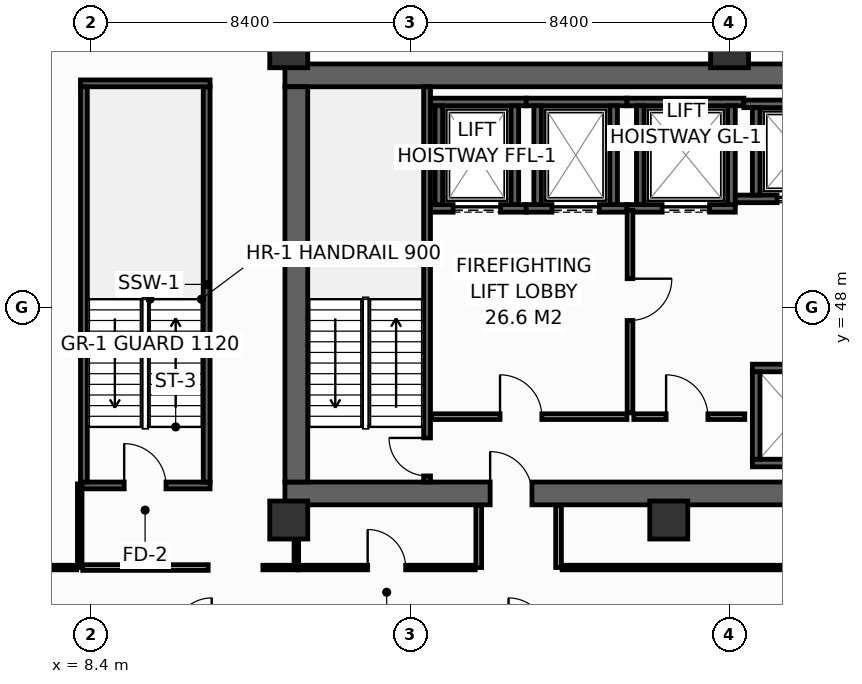
"""IFC4 building model, lengths in metres.
Left out: names, types, materials, properties, quantities, classifications, styles, units other than length and angle.
Written with IfcOpenShell. Run it as: python <this file> out.ifc"""

import sys

from ifc_helpers import new_model, si_unit, direction, frame, frame_2d, origin, origin_2d, place, context, subcontext, project, spatial, rectangle, hollow_rectangle, extrude, element, fill, save


model = new_model("IFC4")
c1 = context("Model", 3, precision=1e-05, world=origin(), true_north=direction((0.0, 1.0)))
c2 = subcontext(c1, "Body", "Model", "MODEL_VIEW")
j1 = project(units=[si_unit("LENGTHUNIT", "METRE"), si_unit("PLANEANGLEUNIT", "RADIAN")], contexts=[c1])
p1 = place(None, origin())
s1 = spatial("IfcSite", under=j1, at=p1, CompositionType="ELEMENT")
p2 = place(p1, origin())
s2 = spatial("IfcBuilding", under=s1, at=p2, CompositionType="ELEMENT")
p3 = place(p2, frame((0.0, 0.0, 106.0)))
s3 = spatial("IfcBuildingStorey", under=s2, at=p3, CompositionType="ELEMENT", Elevation=106.0)
p4 = place(p3, frame((13.5, 43.1, 0.0), z_axis=(0.0, 0.0, 1.0), x_axis=(1.0, 0.0, 0.0)))
e1 = element("IfcWall", 1, at=p4, inside=s3, PredefinedType="SHEAR", context=c2, shape_type="SweptSolid", body=[
    extrude(rectangle(XDim=32.9, YDim=0.6, at=frame_2d((16.45, 0.0))), origin(), (0.0, 0.0, 1.0), 4.15),
])
p5 = place(p4, frame((5.4, 0.0, 0.0)))
e2 = element("IfcOpeningElement", 2, at=p5, cuts=e1, PredefinedType="OPENING", context=c2, shape_type="SweptSolid", body=[
    extrude(rectangle(XDim=1.1, YDim=2.15, at=frame_2d((0.55, 1.075))), frame((0.0, 0.31, 0.0), z_axis=(0.0, -1.0, 0.0), x_axis=(1.0, 0.0, 0.0)), (0.0, 0.0, 1.0), 0.62),
])
p6 = place(p4, frame((25.6, 0.0, 0.0)))
e3 = element("IfcOpeningElement", 3, at=p6, cuts=e1, PredefinedType="OPENING", context=c2, shape_type="SweptSolid", body=[
    extrude(rectangle(XDim=1.1, YDim=2.15, at=frame_2d((0.55, 1.075))), frame((0.0, 0.31, 0.0), z_axis=(0.0, -1.0, 0.0), x_axis=(1.0, 0.0, 0.0)), (0.0, 0.0, 1.0), 0.62),
])
p7 = place(p3, frame((13.5, 54.1, 0.0), z_axis=(0.0, 0.0, 1.0), x_axis=(1.0, 0.0, 0.0)))
e4 = element("IfcWall", 4, at=p7, inside=s3, PredefinedType="SHEAR", context=c2, shape_type="SweptSolid", body=[
    extrude(rectangle(XDim=32.9, YDim=0.6, at=frame_2d((16.45, 0.0))), origin(), (0.0, 0.0, 1.0), 4.15),
])
p8 = place(p3, frame((13.8, 43.4, 0.0), z_axis=(0.0, 0.0, 1.0), x_axis=(0.0, 1.0, 0.0)))
e5 = element("IfcWall", 5, at=p8, inside=s3, PredefinedType="SHEAR", context=c2, shape_type="SweptSolid", body=[
    extrude(rectangle(XDim=10.4, YDim=0.6, at=frame_2d((5.2, 0.0))), origin(), (0.0, 0.0, 1.0), 4.15),
])
for number, where, z_axis, x_axis in (
    (6, (13.6, 54.8, 0.0), (0.0, 0.0, 1.0), (1.0, 0.0, 0.0)),
    (7, (25.2, 54.8, 0.0), (0.0, 0.0, 1.0), (1.0, 0.0, 0.0)),
    (8, (13.6, 42.4, 0.0), (0.0, 0.0, 1.0), (1.0, 0.0, 0.0)),
    (9, (23.6, 42.4, 0.0), (0.0, 0.0, 1.0), (1.0, 0.0, 0.0)),
):
    element("IfcColumn", number, at=place(p3, frame(where, z_axis=z_axis, x_axis=x_axis)), inside=s3, PredefinedType="COLUMN", context=c2, shape_type="SweptSolid", body=[
        extrude(hollow_rectangle(XDim=1.0, YDim=1.0, WallThickness=0.045, at=origin_2d()), origin(), (0.0, 0.0, 1.0), 4.4),
    ])
p9 = place(p3, frame((17.33, 50.6, 0.0), z_axis=(0.0, 0.0, 1.0), x_axis=(1.0, 0.0, 0.0)))
e10 = element("IfcWall", 10, at=p9, inside=s3, PredefinedType="SHEAR", context=c2, shape_type="SweptSolid", body=[
    extrude(rectangle(XDim=2.52, YDim=0.2, at=frame_2d((1.26, 0.0))), origin(), (0.0, 0.0, 1.0), 4.15),
])
p10 = place(p9, frame((0.595, 0.0, 0.0)))
e11 = element("IfcOpeningElement", 11, at=p10, cuts=e10, PredefinedType="OPENING", context=c2, shape_type="SweptSolid", body=[
    extrude(rectangle(XDim=1.25, YDim=2.3, at=frame_2d((0.625, 1.15))), frame((0.0, 0.11, 0.0), z_axis=(0.0, -1.0, 0.0), x_axis=(1.0, 0.0, 0.0)), (0.0, 0.0, 1.0), 0.22),
])
p11 = place(p3, frame((17.33, 53.4, 0.0), z_axis=(0.0, 0.0, 1.0), x_axis=(1.0, 0.0, 0.0)))
e12 = element("IfcWall", 12, at=p11, inside=s3, PredefinedType="SHEAR", context=c2, shape_type="SweptSolid", body=[
    extrude(rectangle(XDim=2.52, YDim=0.2, at=frame_2d((1.26, 0.0))), origin(), (0.0, 0.0, 1.0), 4.15),
])
for number, where, z_axis, x_axis in (
    (13, (17.55, 50.7, 0.0), (0.0, 0.0, 1.0), (0.0, 1.0, 0.0)),
    (14, (19.55, 50.7, 0.0), (0.0, 0.0, 1.0), (0.0, 1.0, 0.0)),
):
    element("IfcWall", number, at=place(p3, frame(where, z_axis=z_axis, x_axis=x_axis)), inside=s3, PredefinedType="SHEAR", context=c2, shape_type="SweptSolid", body=[
        extrude(rectangle(XDim=2.6, YDim=0.2, at=frame_2d((1.3, 0.0))), origin(), (0.0, 0.0, 1.0), 4.15),
    ])
p12 = place(p3, frame((19.85, 50.6, 0.0), z_axis=(0.0, 0.0, 1.0), x_axis=(1.0, 0.0, 0.0)))
e15 = element("IfcWall", 15, at=p12, inside=s3, PredefinedType="SHEAR", context=c2, shape_type="SweptSolid", body=[
    extrude(rectangle(XDim=2.65, YDim=0.2, at=frame_2d((1.325, 0.0))), origin(), (0.0, 0.0, 1.0), 4.15),
])
p13 = place(p12, frame((0.675, 0.0, 0.0)))
e16 = element("IfcOpeningElement", 16, at=p13, cuts=e15, PredefinedType="OPENING", context=c2, shape_type="SweptSolid", body=[
    extrude(rectangle(XDim=1.25, YDim=2.3, at=frame_2d((0.625, 1.15))), frame((0.0, 0.11, 0.0), z_axis=(0.0, -1.0, 0.0), x_axis=(1.0, 0.0, 0.0)), (0.0, 0.0, 1.0), 0.22),
])
p14 = place(p3, frame((19.85, 53.4, 0.0), z_axis=(0.0, 0.0, 1.0), x_axis=(1.0, 0.0, 0.0)))
e17 = element("IfcWall", 17, at=p14, inside=s3, PredefinedType="SHEAR", context=c2, shape_type="SweptSolid", body=[
    extrude(rectangle(XDim=2.65, YDim=0.2, at=frame_2d((1.325, 0.0))), origin(), (0.0, 0.0, 1.0), 4.15),
])
for number, where, z_axis, x_axis in (
    (18, (20.15, 50.7, 0.0), (0.0, 0.0, 1.0), (0.0, 1.0, 0.0)),
    (19, (22.15, 50.7, 0.0), (0.0, 0.0, 1.0), (0.0, 1.0, 0.0)),
):
    element("IfcWall", number, at=place(p3, frame(where, z_axis=z_axis, x_axis=x_axis)), inside=s3, PredefinedType="SHEAR", context=c2, shape_type="SweptSolid", body=[
        extrude(rectangle(XDim=2.6, YDim=0.2, at=frame_2d((1.3, 0.0))), origin(), (0.0, 0.0, 1.0), 4.15),
    ])
p15 = place(p3, frame((22.5, 50.6, 0.0), z_axis=(0.0, 0.0, 1.0), x_axis=(1.0, 0.0, 0.0)))
e20 = element("IfcWall", 20, at=p15, inside=s3, PredefinedType="SHEAR", context=c2, shape_type="SweptSolid", body=[
    extrude(rectangle(XDim=2.85, YDim=0.2, at=frame_2d((1.425, 0.0))), origin(), (0.0, 0.0, 1.0), 4.15),
])
p16 = place(p15, frame((0.925, 0.0, 0.0)))
e21 = element("IfcOpeningElement", 21, at=p16, cuts=e20, PredefinedType="OPENING", context=c2, shape_type="SweptSolid", body=[
    extrude(rectangle(XDim=1.25, YDim=2.3, at=frame_2d((0.625, 1.15))), frame((0.0, 0.11, 0.0), z_axis=(0.0, -1.0, 0.0), x_axis=(1.0, 0.0, 0.0)), (0.0, 0.0, 1.0), 0.22),
])
p17 = place(p3, frame((22.5, 53.4, 0.0), z_axis=(0.0, 0.0, 1.0), x_axis=(1.0, 0.0, 0.0)))
e22 = element("IfcWall", 22, at=p17, inside=s3, PredefinedType="SHEAR", context=c2, shape_type="SweptSolid", body=[
    extrude(rectangle(XDim=3.075, YDim=0.2, at=frame_2d((1.538, 0.0))), origin(), (0.0, 0.0, 1.0), 4.15),
])
for number, where, z_axis, x_axis in (
    (23, (22.85, 50.7, 0.0), (0.0, 0.0, 1.0), (0.0, 1.0, 0.0)),
    (24, (25.25, 50.7, 0.0), (0.0, 0.0, 1.0), (0.0, 1.0, 0.0)),
):
    element("IfcWall", number, at=place(p3, frame(where, z_axis=z_axis, x_axis=x_axis)), inside=s3, PredefinedType="SHEAR", context=c2, shape_type="SweptSolid", body=[
        extrude(rectangle(XDim=2.6, YDim=0.2, at=frame_2d((1.3, 0.0))), origin(), (0.0, 0.0, 1.0), 4.15),
    ])
p18 = place(p3, frame((25.35, 50.85, 0.0), z_axis=(0.0, 0.0, 1.0), x_axis=(1.0, 0.0, 0.0)))
e25 = element("IfcWall", 25, at=p18, inside=s3, PredefinedType="SHEAR", context=c2, shape_type="SweptSolid", body=[
    extrude(rectangle(XDim=3.025, YDim=0.2, at=frame_2d((1.512, 0.0))), origin(), (0.0, 0.0, 1.0), 4.15),
])
p19 = place(p18, frame((1.1, 0.0, 0.0)))
e26 = element("IfcOpeningElement", 26, at=p19, cuts=e25, PredefinedType="OPENING", context=c2, shape_type="SweptSolid", body=[
    extrude(rectangle(XDim=1.1, YDim=2.2, at=frame_2d((0.55, 1.1))), frame((0.0, 0.11, 0.0), z_axis=(0.0, -1.0, 0.0), x_axis=(1.0, 0.0, 0.0)), (0.0, 0.0, 1.0), 0.22),
])
p20 = place(p3, frame((25.575, 53.35, 0.0), z_axis=(0.0, 0.0, 1.0), x_axis=(1.0, 0.0, 0.0)))
e27 = element("IfcWall", 27, at=p20, inside=s3, PredefinedType="SHEAR", context=c2, shape_type="SweptSolid", body=[
    extrude(rectangle(XDim=2.8, YDim=0.2, at=frame_2d((1.4, 0.0))), origin(), (0.0, 0.0, 1.0), 4.15),
])
p21 = place(p3, frame((25.9, 50.95, 0.0), z_axis=(0.0, 0.0, 1.0), x_axis=(0.0, 1.0, 0.0)))
e28 = element("IfcWall", 28, at=p21, inside=s3, PredefinedType="SHEAR", context=c2, shape_type="SweptSolid", body=[
    extrude(rectangle(XDim=2.3, YDim=0.2, at=frame_2d((1.15, 0.0))), origin(), (0.0, 0.0, 1.0), 4.15),
])
for number, where, z_axis, x_axis in (
    (29, (25.8, 43.9, 0.0), (0.0, 0.0, 1.0), (1.0, 0.0, 0.0)),
    (30, (25.8, 46.4, 0.0), (0.0, 0.0, 1.0), (1.0, 0.0, 0.0)),
):
    element("IfcWall", number, at=place(p3, frame(where, z_axis=z_axis, x_axis=x_axis)), inside=s3, PredefinedType="SHEAR", context=c2, shape_type="SweptSolid", body=[
        extrude(rectangle(XDim=2.575, YDim=0.2, at=frame_2d((1.288, 0.0))), origin(), (0.0, 0.0, 1.0), 4.15),
    ])
p22 = place(p3, frame((25.9, 44.0, 0.0), z_axis=(0.0, 0.0, 1.0), x_axis=(0.0, 1.0, 0.0)))
e31 = element("IfcWall", 31, at=p22, inside=s3, PredefinedType="SHEAR", context=c2, shape_type="SweptSolid", body=[
    extrude(rectangle(XDim=2.3, YDim=0.2, at=frame_2d((1.15, 0.0))), origin(), (0.0, 0.0, 1.0), 4.15),
])
p23 = place(p3, frame((17.24, 43.4, 0.0), z_axis=(0.0, 0.0, 1.0), x_axis=(0.0, 1.0, 0.0)))
e32 = element("IfcWall", 32, at=p23, inside=s3, PredefinedType="SHEAR", context=c2, shape_type="SweptSolid", body=[
    extrude(rectangle(XDim=10.4, YDim=0.18, at=frame_2d((5.2, 0.0))), origin(), (0.0, 0.0, 1.0), 4.15),
])
p24 = place(p23, frame((0.16, 0.0, 0.0)))
e33 = element("IfcOpeningElement", 33, at=p24, cuts=e32, PredefinedType="OPENING", context=c2, shape_type="SweptSolid", body=[
    extrude(rectangle(XDim=1.0, YDim=2.15, at=frame_2d((0.5, 1.075))), frame((0.0, 0.1, 0.0), z_axis=(0.0, -1.0, 0.0), x_axis=(1.0, 0.0, 0.0)), (0.0, 0.0, 1.0), 0.2),
])
p25 = place(p3, frame((8.12, 43.31, 0.0), z_axis=(0.0, 0.0, 1.0), x_axis=(1.0, 0.0, 0.0)))
e34 = element("IfcWall", 34, at=p25, inside=s3, PredefinedType="SHEAR", context=c2, shape_type="SweptSolid", body=[
    extrude(rectangle(XDim=3.41, YDim=0.18, at=frame_2d((1.705, 0.0))), origin(), (0.0, 0.0, 1.0), 4.15),
])
p26 = place(p25, frame((1.15, 0.0, 0.0)))
e35 = element("IfcOpeningElement", 35, at=p26, cuts=e34, PredefinedType="OPENING", context=c2, shape_type="SweptSolid", body=[
    extrude(rectangle(XDim=1.1, YDim=2.15, at=frame_2d((0.55, 1.075))), frame((0.0, 0.1, 0.0), z_axis=(0.0, -1.0, 0.0), x_axis=(1.0, 0.0, 0.0)), (0.0, 0.0, 1.0), 0.2),
])
p27 = place(p3, frame((11.44, 43.4, 0.0), z_axis=(0.0, 0.0, 1.0), x_axis=(0.0, 1.0, 0.0)))
e36 = element("IfcWall", 36, at=p27, inside=s3, PredefinedType="SHEAR", context=c2, shape_type="SweptSolid", body=[
    extrude(rectangle(XDim=10.4, YDim=0.18, at=frame_2d((5.2, 0.0))), origin(), (0.0, 0.0, 1.0), 4.15),
])
p28 = place(p3, frame((11.53, 53.89, 0.0), z_axis=(0.0, 0.0, 1.0), x_axis=(-1.0, 0.0, 0.0)))
e37 = element("IfcWall", 37, at=p28, inside=s3, PredefinedType="SHEAR", context=c2, shape_type="SweptSolid", body=[
    extrude(rectangle(XDim=3.41, YDim=0.18, at=frame_2d((1.705, 0.0))), origin(), (0.0, 0.0, 1.0), 4.15),
])
p29 = place(p3, frame((8.21, 53.8, 0.0), z_axis=(0.0, 0.0, 1.0), x_axis=(0.0, -1.0, 0.0)))
e38 = element("IfcWall", 38, at=p29, inside=s3, PredefinedType="SHEAR", context=c2, shape_type="SweptSolid", body=[
    extrude(rectangle(XDim=10.4, YDim=0.18, at=frame_2d((5.2, 0.0))), origin(), (0.0, 0.0, 1.0), 4.15),
])
p30 = place(p3, frame((17.36, 45.12, 0.0), z_axis=(0.0, 0.0, 1.0), x_axis=(1.0, 0.0, 0.0)))
e39 = element("IfcWall", 39, at=p30, inside=s3, PredefinedType="PARTITIONING", context=c2, shape_type="SweptSolid", body=[
    extrude(rectangle(XDim=5.14, YDim=0.15, at=frame_2d((2.57, 0.0))), origin(), (0.0, 0.0, 1.0), 4.15),
])
p31 = place(p30, frame((1.8, 0.0, 0.0)))
e40 = element("IfcOpeningElement", 40, at=p31, cuts=e39, PredefinedType="OPENING", context=c2, shape_type="SweptSolid", body=[
    extrude(rectangle(XDim=1.1, YDim=2.15, at=frame_2d((0.55, 1.075))), frame((0.0, 0.085, 0.0), z_axis=(0.0, -1.0, 0.0), x_axis=(1.0, 0.0, 0.0)), (0.0, 0.0, 1.0), 0.17),
])
p32 = place(p3, frame((22.58, 50.55, 0.0), z_axis=(0.0, 0.0, 1.0), x_axis=(0.0, -1.0, 0.0)))
e41 = element("IfcWall", 41, at=p32, inside=s3, PredefinedType="PARTITIONING", context=c2, shape_type="SweptSolid", body=[
    extrude(rectangle(XDim=5.33, YDim=0.15, at=frame_2d((2.665, 0.0))), origin(), (0.0, 0.0, 1.0), 4.15),
])
p33 = place(p32, frame((1.8, 0.0, 0.0)))
e42 = element("IfcOpeningElement", 42, at=p33, cuts=e41, PredefinedType="OPENING", context=c2, shape_type="SweptSolid", body=[
    extrude(rectangle(XDim=1.1, YDim=2.15, at=frame_2d((0.55, 1.075))), frame((0.0, 0.085, 0.0), z_axis=(0.0, -1.0, 0.0), x_axis=(1.0, 0.0, 0.0)), (0.0, 0.0, 1.0), 0.17),
])
p34 = place(p3, frame((22.68, 45.12, 0.0), z_axis=(0.0, 0.0, 1.0), x_axis=(1.0, 0.0, 0.0)))
e43 = element("IfcWall", 43, at=p34, inside=s3, PredefinedType="PARTITIONING", context=c2, shape_type="SweptSolid", body=[
    extrude(rectangle(XDim=2.92, YDim=0.15, at=frame_2d((1.46, 0.0))), origin(), (0.0, 0.0, 1.0), 4.15),
])
p35 = place(p34, frame((0.85, 0.0, 0.0)))
e44 = element("IfcOpeningElement", 44, at=p35, cuts=e43, PredefinedType="OPENING", context=c2, shape_type="SweptSolid", body=[
    extrude(rectangle(XDim=1.1, YDim=2.15, at=frame_2d((0.55, 1.075))), frame((0.0, 0.085, 0.0), z_axis=(0.0, -1.0, 0.0), x_axis=(1.0, 0.0, 0.0)), (0.0, 0.0, 1.0), 0.17),
])
p36 = place(p3, frame((12.92, 41.15, 0.0), z_axis=(0.0, 0.0, 1.0), x_axis=(1.0, 0.0, 0.0)))
e45 = element("IfcWall", 45, at=p36, inside=s3, PredefinedType="PARTITIONING", context=c2, shape_type="SweptSolid", body=[
    extrude(rectangle(XDim=0.93, YDim=0.12, at=frame_2d((0.465, 0.0))), origin(), (0.0, 0.0, 1.0), 4.15),
])
p37 = place(p3, frame((13.8, 41.23, 0.0), z_axis=(0.0, 0.0, 1.0), x_axis=(0.0, 1.0, 0.0)))
e46 = element("IfcWall", 46, at=p37, inside=s3, PredefinedType="PARTITIONING", context=c2, shape_type="SweptSolid", body=[
    extrude(rectangle(XDim=1.55, YDim=0.12, at=frame_2d((0.775, 0.0))), origin(), (0.0, 0.0, 1.0), 4.15),
])
p38 = place(p3, frame((8.1, 41.15, 0.0), z_axis=(0.0, 0.0, 1.0), x_axis=(0.0, 1.0, 0.0)))
e47 = element("IfcWall", 47, at=p38, inside=s3, PredefinedType="PARTITIONING", context=c2, shape_type="SweptSolid", body=[
    extrude(rectangle(XDim=2.2, YDim=0.12, at=frame_2d((1.1, 0.0))), origin(), (0.0, 0.0, 1.0), 3.335),
])
p39 = place(p3, frame((8.18, 41.15, 0.0), z_axis=(0.0, 0.0, 1.0), x_axis=(1.0, 0.0, 0.0)))
e48 = element("IfcWall", 48, at=p39, inside=s3, PredefinedType="PARTITIONING", context=c2, shape_type="SweptSolid", body=[
    extrude(rectangle(XDim=3.3, YDim=0.15, at=frame_2d((1.65, 0.0))), origin(), (0.0, 0.0, 1.0), 4.15),
])
p40 = place(p3, frame((5.942, 41.15, 0.0), z_axis=(0.0, 0.0, 1.0), x_axis=(1.0, 0.0, 0.0)))
e49 = element("IfcWall", 49, at=p40, inside=s3, PredefinedType="PARTITIONING", context=c2, shape_type="SweptSolid", body=[
    extrude(rectangle(XDim=2.078, YDim=0.12, at=frame_2d((1.039, 0.0))), origin(), (0.0, 0.0, 1.0), 3.635),
])
for number, where, z_axis, x_axis in (
    (50, (18.6, 41.15, 0.0), (0.0, 0.0, 1.0), (0.0, 1.0, 0.0)),
    (51, (20.7, 41.15, 0.0), (0.0, 0.0, 1.0), (0.0, 1.0, 0.0)),
):
    element("IfcWall", number, at=place(p3, frame(where, z_axis=z_axis, x_axis=x_axis)), inside=s3, PredefinedType="PARTITIONING", context=c2, shape_type="SweptSolid", body=[
        extrude(rectangle(XDim=1.63, YDim=0.15, at=frame_2d((0.815, 0.0))), origin(), (0.0, 0.0, 1.0), 4.15),
    ])
p41 = place(p3, frame((13.85, 41.15, 0.0), z_axis=(0.0, 0.0, 1.0), x_axis=(1.0, 0.0, 0.0)))
e52 = element("IfcWall", 52, at=p41, inside=s3, PredefinedType="PARTITIONING", context=c2, shape_type="SweptSolid", body=[
    extrude(rectangle(XDim=4.655, YDim=0.12, at=frame_2d((2.327, 0.0))), origin(), (0.0, 0.0, 1.0), 4.15),
])
p42 = place(p41, frame((1.827, 0.0, 0.0)))
e53 = element("IfcOpeningElement", 53, at=p42, cuts=e52, PredefinedType="OPENING", context=c2, shape_type="SweptSolid", body=[
    extrude(rectangle(XDim=1.0, YDim=2.15, at=frame_2d((0.5, 1.075))), frame((0.0, 0.07, 0.0), z_axis=(0.0, -1.0, 0.0), x_axis=(1.0, 0.0, 0.0)), (0.0, 0.0, 1.0), 0.14),
])
p43 = place(p3, frame((20.795, 41.15, 0.0), z_axis=(0.0, 0.0, 1.0), x_axis=(1.0, 0.0, 0.0)))
e54 = element("IfcWall", 54, at=p43, inside=s3, PredefinedType="PARTITIONING", context=c2, shape_type="SweptSolid", body=[
    extrude(rectangle(XDim=17.91, YDim=0.12, at=frame_2d((8.955, 0.0))), origin(), (0.0, 0.0, 1.0), 3.335),
])
p44 = place(p43, frame((8.455, 0.0, 0.0)))
e55 = element("IfcOpeningElement", 55, at=p44, cuts=e54, PredefinedType="OPENING", context=c2, shape_type="SweptSolid", body=[
    extrude(rectangle(XDim=1.0, YDim=2.15, at=frame_2d((0.5, 1.075))), frame((0.0, 0.07, 0.0), z_axis=(0.0, -1.0, 0.0), x_axis=(1.0, 0.0, 0.0)), (0.0, 0.0, 1.0), 0.14),
])
p45 = place(p10, origin())
e56 = element("IfcDoor", 56, at=p45, inside=s3, OperationType="SLIDING_TO_LEFT", PredefinedType="DOOR", context=c2, shape_type="SweptSolid", body=[
    extrude(rectangle(XDim=1.25, YDim=2.3, at=frame_2d((0.625, 1.15))), frame((0.0, 0.025, 0.0), z_axis=(0.0, -1.0, 0.0), x_axis=(1.0, 0.0, 0.0)), (0.0, 0.0, 1.0), 0.05),
])
fill(e11, e56)
p46 = place(p13, origin())
e57 = element("IfcDoor", 57, at=p46, inside=s3, OperationType="SLIDING_TO_LEFT", PredefinedType="DOOR", context=c2, shape_type="SweptSolid", body=[
    extrude(rectangle(XDim=1.25, YDim=2.3, at=frame_2d((0.625, 1.15))), frame((0.0, 0.025, 0.0), z_axis=(0.0, -1.0, 0.0), x_axis=(1.0, 0.0, 0.0)), (0.0, 0.0, 1.0), 0.05),
])
fill(e16, e57)
p47 = place(p16, origin())
e58 = element("IfcDoor", 58, at=p47, inside=s3, OperationType="SLIDING_TO_LEFT", PredefinedType="DOOR", context=c2, shape_type="SweptSolid", body=[
    extrude(rectangle(XDim=1.25, YDim=2.3, at=frame_2d((0.625, 1.15))), frame((0.0, 0.025, 0.0), z_axis=(0.0, -1.0, 0.0), x_axis=(1.0, 0.0, 0.0)), (0.0, 0.0, 1.0), 0.05),
])
fill(e21, e58)
p48 = place(p19, origin())
e59 = element("IfcDoor", 59, at=p48, inside=s3, OperationType="SLIDING_TO_LEFT", PredefinedType="DOOR", context=c2, shape_type="SweptSolid", body=[
    extrude(rectangle(XDim=1.1, YDim=2.2, at=frame_2d((0.55, 1.1))), frame((0.0, 0.025, 0.0), z_axis=(0.0, -1.0, 0.0), x_axis=(1.0, 0.0, 0.0)), (0.0, 0.0, 1.0), 0.05),
])
fill(e26, e59)
p49 = place(p24, origin())
e60 = element("IfcDoor", 60, at=p49, inside=s3, OperationType="SINGLE_SWING_RIGHT", PredefinedType="DOOR", context=c2, shape_type="SweptSolid", body=[
    extrude(rectangle(XDim=1.0, YDim=2.15, at=frame_2d((0.5, 1.075))), frame((0.0, 0.025, 0.0), z_axis=(0.0, -1.0, 0.0), x_axis=(1.0, 0.0, 0.0)), (0.0, 0.0, 1.0), 0.05),
])
fill(e33, e60)
p50 = place(p26, origin())
e61 = element("IfcDoor", 61, at=p50, inside=s3, OperationType="SINGLE_SWING_LEFT", PredefinedType="DOOR", context=c2, shape_type="SweptSolid", body=[
    extrude(rectangle(XDim=1.1, YDim=2.15, at=frame_2d((0.55, 1.075))), frame((0.0, 0.025, 0.0), z_axis=(0.0, -1.0, 0.0), x_axis=(1.0, 0.0, 0.0)), (0.0, 0.0, 1.0), 0.05),
])
fill(e35, e61)
p51 = place(p31, origin())
e62 = element("IfcDoor", 62, at=p51, inside=s3, OperationType="SINGLE_SWING_LEFT", PredefinedType="DOOR", context=c2, shape_type="SweptSolid", body=[
    extrude(rectangle(XDim=1.1, YDim=2.15, at=frame_2d((0.55, 1.075))), frame((0.0, 0.025, 0.0), z_axis=(0.0, -1.0, 0.0), x_axis=(1.0, 0.0, 0.0)), (0.0, 0.0, 1.0), 0.05),
])
fill(e40, e62)
p52 = place(p33, origin())
e63 = element("IfcDoor", 63, at=p52, inside=s3, OperationType="SINGLE_SWING_LEFT", PredefinedType="DOOR", context=c2, shape_type="SweptSolid", body=[
    extrude(rectangle(XDim=1.1, YDim=2.15, at=frame_2d((0.55, 1.075))), frame((0.0, 0.025, 0.0), z_axis=(0.0, -1.0, 0.0), x_axis=(1.0, 0.0, 0.0)), (0.0, 0.0, 1.0), 0.05),
])
fill(e42, e63)
p53 = place(p35, origin())
e64 = element("IfcDoor", 64, at=p53, inside=s3, OperationType="SINGLE_SWING_LEFT", PredefinedType="DOOR", context=c2, shape_type="SweptSolid", body=[
    extrude(rectangle(XDim=1.1, YDim=2.15, at=frame_2d((0.55, 1.075))), frame((0.0, 0.025, 0.0), z_axis=(0.0, -1.0, 0.0), x_axis=(1.0, 0.0, 0.0)), (0.0, 0.0, 1.0), 0.05),
])
fill(e44, e64)
p54 = place(p5, origin())
e65 = element("IfcDoor", 65, at=p54, inside=s3, OperationType="SINGLE_SWING_LEFT", PredefinedType="DOOR", context=c2, shape_type="SweptSolid", body=[
    extrude(rectangle(XDim=1.1, YDim=2.15, at=frame_2d((0.55, 1.075))), frame((0.0, 0.025, 0.0), z_axis=(0.0, -1.0, 0.0), x_axis=(1.0, 0.0, 0.0)), (0.0, 0.0, 1.0), 0.05),
])
fill(e2, e65)
p55 = place(p42, origin())
e66 = element("IfcDoor", 66, at=p55, inside=s3, OperationType="SINGLE_SWING_LEFT", PredefinedType="DOOR", context=c2, shape_type="SweptSolid", body=[
    extrude(rectangle(XDim=1.0, YDim=2.15, at=frame_2d((0.5, 1.075))), frame((0.0, 0.025, 0.0), z_axis=(0.0, -1.0, 0.0), x_axis=(1.0, 0.0, 0.0)), (0.0, 0.0, 1.0), 0.05),
])
fill(e53, e66)
save(model, sys.argv[1])
